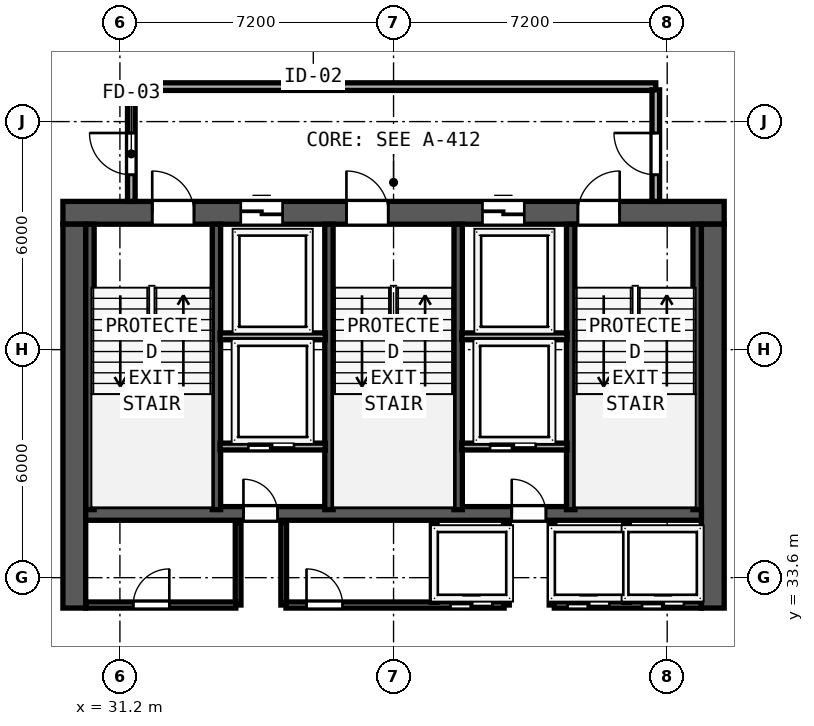
"""IFC4 building model, lengths in metres.
Left out: names, types, materials, properties, quantities, classifications, styles, units other than length and angle.
Written with IfcOpenShell. Run it as: python <this file> out.ifc"""

import sys

from ifc_helpers import new_model, si_unit, direction, frame, frame_2d, origin, place, context, subcontext, project, spatial, rectangle, extrude, element, fill, save


model = new_model("IFC4")
c1 = context("Model", 3, precision=1e-05, world=origin(), true_north=direction((0.0, 1.0)))
c2 = subcontext(c1, "Body", "Model", "MODEL_VIEW")
j1 = project(units=[si_unit("LENGTHUNIT", "METRE"), si_unit("PLANEANGLEUNIT", "RADIAN")], contexts=[c1])
p1 = place(None, origin())
s1 = spatial("IfcSite", under=j1, at=p1, CompositionType="ELEMENT")
p2 = place(p1, origin())
s2 = spatial("IfcBuilding", under=s1, at=p2, CompositionType="ELEMENT")
p3 = place(p2, frame((0.0, 0.0, 169.0)))
s3 = spatial("IfcBuildingStorey", under=s2, at=p3, CompositionType="ELEMENT", Elevation=169.0)
p4 = place(p3, frame((29.7, 43.2, 0.0), z_axis=(0.0, 0.0, 1.0), x_axis=(1.0, 0.0, 0.0)))
e1 = element("IfcWall", 1, at=p4, inside=s3, PredefinedType="SHEAR", context=c2, shape_type="SweptSolid", body=[
    extrude(rectangle(XDim=17.4, YDim=0.6, at=frame_2d((8.7, 0.0))), origin(), (0.0, 0.0, 1.0), 3.62),
])
p5 = place(p4, frame((2.35, 0.0, 0.0)))
e2 = element("IfcOpeningElement", 2, at=p5, cuts=e1, PredefinedType="OPENING", context=c2, shape_type="SweptSolid", body=[
    extrude(rectangle(XDim=1.1, YDim=2.15, at=frame_2d((0.55, 1.075))), frame((0.0, 0.31, 0.0), z_axis=(0.0, -1.0, 0.0), x_axis=(1.0, 0.0, 0.0)), (0.0, 0.0, 1.0), 0.62),
])
p6 = place(p4, frame((7.46, 0.0, 0.0)))
e3 = element("IfcOpeningElement", 3, at=p6, cuts=e1, PredefinedType="OPENING", context=c2, shape_type="SweptSolid", body=[
    extrude(rectangle(XDim=1.1, YDim=2.15, at=frame_2d((0.55, 1.075))), frame((0.0, 0.31, 0.0), z_axis=(0.0, -1.0, 0.0), x_axis=(1.0, 0.0, 0.0)), (0.0, 0.0, 1.0), 0.62),
])
p7 = place(p4, frame((13.55, 0.0, 0.0)))
e4 = element("IfcOpeningElement", 4, at=p7, cuts=e1, PredefinedType="OPENING", context=c2, shape_type="SweptSolid", body=[
    extrude(rectangle(XDim=1.1, YDim=2.15, at=frame_2d((0.55, 1.075))), frame((0.0, 0.31, 0.0), z_axis=(0.0, -1.0, 0.0), x_axis=(1.0, 0.0, 0.0)), (0.0, 0.0, 1.0), 0.62),
])
p8 = place(p4, frame((4.68, 0.0, 0.0)))
e5 = element("IfcOpeningElement", 5, at=p8, cuts=e1, PredefinedType="OPENING", context=c2, shape_type="SweptSolid", body=[
    extrude(rectangle(XDim=1.1, YDim=2.2, at=frame_2d((0.55, 1.1))), frame((0.0, 0.31, 0.0), z_axis=(0.0, -1.0, 0.0), x_axis=(1.0, 0.0, 0.0)), (0.0, 0.0, 1.0), 0.62),
])
p9 = place(p4, frame((11.04, 0.0, 0.0)))
e6 = element("IfcOpeningElement", 6, at=p9, cuts=e1, PredefinedType="OPENING", context=c2, shape_type="SweptSolid", body=[
    extrude(rectangle(XDim=1.1, YDim=2.2, at=frame_2d((0.55, 1.1))), frame((0.0, 0.31, 0.0), z_axis=(0.0, -1.0, 0.0), x_axis=(1.0, 0.0, 0.0)), (0.0, 0.0, 1.0), 0.62),
])
for number, where, z_axis, x_axis in (
    (7, (30.0, 32.8, 0.0), (0.0, 0.0, 1.0), (0.0, 1.0, 0.0)),
    (8, (46.8, 32.8, 0.0), (0.0, 0.0, 1.0), (0.0, 1.0, 0.0)),
):
    element("IfcWall", number, at=place(p3, frame(where, z_axis=z_axis, x_axis=x_axis)), inside=s3, PredefinedType="SHEAR", context=c2, shape_type="SweptSolid", body=[
        extrude(rectangle(XDim=10.1, YDim=0.6, at=frame_2d((5.05, 0.0))), origin(), (0.0, 0.0, 1.0), 3.62),
    ])
p10 = place(p3, frame((30.3, 35.29, 0.0), z_axis=(0.0, 0.0, 1.0), x_axis=(1.0, 0.0, 0.0)))
e9 = element("IfcWall", 9, at=p10, inside=s3, PredefinedType="SHEAR", context=c2, shape_type="SweptSolid", body=[
    extrude(rectangle(XDim=16.2, YDim=0.36, at=frame_2d((8.1, 0.0))), origin(), (0.0, 0.0, 1.0), 3.62),
])
p11 = place(p10, frame((5.05, 0.0, 0.0), z_axis=(0.0, 0.0, 1.0), x_axis=(-1.0, 0.0, 0.0)))
e10 = element("IfcOpeningElement", 10, at=p11, cuts=e9, PredefinedType="OPENING", context=c2, shape_type="SweptSolid", body=[
    extrude(rectangle(XDim=0.9, YDim=2.1, at=frame_2d((0.45, 1.05))), frame((0.0, 0.19, 0.0), z_axis=(0.0, -1.0, 0.0), x_axis=(1.0, 0.0, 0.0)), (0.0, 0.0, 1.0), 0.38),
])
p12 = place(p10, frame((12.11, 0.0, 0.0), z_axis=(0.0, 0.0, 1.0), x_axis=(-1.0, 0.0, 0.0)))
e11 = element("IfcOpeningElement", 11, at=p12, cuts=e9, PredefinedType="OPENING", context=c2, shape_type="SweptSolid", body=[
    extrude(rectangle(XDim=0.9, YDim=2.1, at=frame_2d((0.45, 1.05))), frame((0.0, 0.19, 0.0), z_axis=(0.0, -1.0, 0.0), x_axis=(1.0, 0.0, 0.0)), (0.0, 0.0, 1.0), 0.38),
])
for number, where, z_axis, x_axis in (
    (12, (30.412, 35.39, 0.0), (0.0, 0.0, 1.0), (0.0, 1.0, 0.0)),
    (13, (33.74, 35.39, 0.0), (0.0, 0.0, 1.0), (0.0, 1.0, 0.0)),
    (14, (36.7, 35.39, 0.0), (0.0, 0.0, 1.0), (0.0, 1.0, 0.0)),
    (15, (40.1, 35.39, 0.0), (0.0, 0.0, 1.0), (0.0, 1.0, 0.0)),
    (16, (43.06, 35.39, 0.0), (0.0, 0.0, 1.0), (0.0, 1.0, 0.0)),
    (17, (46.388, 35.39, 0.0), (0.0, 0.0, 1.0), (0.0, 1.0, 0.0)),
):
    element("IfcWall", number, at=place(p3, frame(where, z_axis=z_axis, x_axis=x_axis)), inside=s3, PredefinedType="SHEAR", context=c2, shape_type="SweptSolid", body=[
        extrude(rectangle(XDim=7.51, YDim=0.22, at=frame_2d((3.755, 0.0))), origin(), (0.0, 0.0, 1.0), 3.62),
    ])
p13 = place(p3, frame((31.5, 46.52, 0.0), z_axis=(0.0, 0.0, 1.0), x_axis=(1.0, 0.0, 0.0)))
e18 = element("IfcWall", 18, at=p13, inside=s3, PredefinedType="SOLIDWALL", context=c2, shape_type="SweptSolid", body=[
    extrude(rectangle(XDim=13.8, YDim=0.2, at=frame_2d((6.9, 0.0))), origin(), (0.0, 0.0, 1.0), 3.62),
])
p14 = place(p3, frame((31.5, 43.5, 0.0), z_axis=(0.0, 0.0, 1.0), x_axis=(0.0, 1.0, 0.0)))
e19 = element("IfcWall", 19, at=p14, inside=s3, PredefinedType="SOLIDWALL", context=c2, shape_type="SweptSolid", body=[
    extrude(rectangle(XDim=2.935, YDim=0.2, at=frame_2d((1.468, 0.0))), origin(), (0.0, 0.0, 1.0), 3.62),
])
p15 = place(p14, frame((1.8, 0.0, 0.0), z_axis=(0.0, 0.0, 1.0), x_axis=(-1.0, 0.0, 0.0)))
e20 = element("IfcOpeningElement", 20, at=p15, cuts=e19, PredefinedType="OPENING", context=c2, shape_type="SweptSolid", body=[
    extrude(rectangle(XDim=1.1, YDim=2.15, at=frame_2d((0.55, 1.075))), frame((0.0, 0.11, 0.0), z_axis=(0.0, -1.0, 0.0), x_axis=(1.0, 0.0, 0.0)), (0.0, 0.0, 1.0), 0.22),
])
p16 = place(p3, frame((45.3, 43.5, 0.0), z_axis=(0.0, 0.0, 1.0), x_axis=(0.0, 1.0, 0.0)))
e21 = element("IfcWall", 21, at=p16, inside=s3, PredefinedType="SOLIDWALL", context=c2, shape_type="SweptSolid", body=[
    extrude(rectangle(XDim=2.935, YDim=0.2, at=frame_2d((1.468, 0.0))), origin(), (0.0, 0.0, 1.0), 3.62),
])
p17 = place(p16, frame((0.7, 0.0, 0.0)))
e22 = element("IfcOpeningElement", 22, at=p17, cuts=e21, PredefinedType="OPENING", context=c2, shape_type="SweptSolid", body=[
    extrude(rectangle(XDim=1.1, YDim=2.15, at=frame_2d((0.55, 1.075))), frame((0.0, 0.11, 0.0), z_axis=(0.0, -1.0, 0.0), x_axis=(1.0, 0.0, 0.0)), (0.0, 0.0, 1.0), 0.22),
])
for number, where, z_axis, x_axis in (
    (23, (33.835, 39.95, 0.0), (0.0, 0.0, 1.0), (1.0, 0.0, 0.0)),
    (24, (40.195, 39.95, 0.0), (0.0, 0.0, 1.0), (1.0, 0.0, 0.0)),
):
    element("IfcWall", number, at=place(p3, frame(where, z_axis=z_axis, x_axis=x_axis)), inside=s3, PredefinedType="SOLIDWALL", context=c2, shape_type="SweptSolid", body=[
        extrude(rectangle(XDim=2.77, YDim=0.18, at=frame_2d((1.385, 0.0))), origin(), (0.0, 0.0, 1.0), 3.62),
    ])
p18 = place(p3, frame((33.835, 37.05, 0.0), z_axis=(0.0, 0.0, 1.0), x_axis=(1.0, 0.0, 0.0)))
e25 = element("IfcWall", 25, at=p18, inside=s3, PredefinedType="SOLIDWALL", context=c2, shape_type="SweptSolid", body=[
    extrude(rectangle(XDim=2.77, YDim=0.18, at=frame_2d((1.385, 0.0))), origin(), (0.0, 0.0, 1.0), 3.62),
])
p19 = place(p18, frame((1.945, 0.0, 0.0), z_axis=(0.0, 0.0, 1.0), x_axis=(-1.0, 0.0, 0.0)))
e26 = element("IfcOpeningElement", 26, at=p19, cuts=e25, PredefinedType="OPENING", context=c2, shape_type="SweptSolid", body=[
    extrude(rectangle(XDim=1.2, YDim=2.2, at=frame_2d((0.6, 1.1))), frame((0.0, 0.1, 0.0), z_axis=(0.0, -1.0, 0.0), x_axis=(1.0, 0.0, 0.0)), (0.0, 0.0, 1.0), 0.2),
])
for number, where, z_axis, x_axis in (
    (27, (34.31, 32.88, 0.0), (0.0, 0.0, 1.0), (0.0, 1.0, 0.0)),
    (28, (35.51, 32.88, 0.0), (0.0, 0.0, 1.0), (0.0, 1.0, 0.0)),
):
    element("IfcWall", number, at=place(p3, frame(where, z_axis=z_axis, x_axis=x_axis)), inside=s3, PredefinedType="SOLIDWALL", context=c2, shape_type="SweptSolid", body=[
        extrude(rectangle(XDim=2.17, YDim=0.15, at=frame_2d((1.085, 0.0))), origin(), (0.0, 0.0, 1.0), 3.62),
    ])
p20 = place(p3, frame((40.195, 37.05, 0.0), z_axis=(0.0, 0.0, 1.0), x_axis=(1.0, 0.0, 0.0)))
e29 = element("IfcWall", 29, at=p20, inside=s3, PredefinedType="SOLIDWALL", context=c2, shape_type="SweptSolid", body=[
    extrude(rectangle(XDim=2.77, YDim=0.18, at=frame_2d((1.385, 0.0))), origin(), (0.0, 0.0, 1.0), 3.62),
])
p21 = place(p20, frame((1.945, 0.0, 0.0), z_axis=(0.0, 0.0, 1.0), x_axis=(-1.0, 0.0, 0.0)))
e30 = element("IfcOpeningElement", 30, at=p21, cuts=e29, PredefinedType="OPENING", context=c2, shape_type="SweptSolid", body=[
    extrude(rectangle(XDim=1.2, YDim=2.2, at=frame_2d((0.6, 1.1))), frame((0.0, 0.1, 0.0), z_axis=(0.0, -1.0, 0.0), x_axis=(1.0, 0.0, 0.0)), (0.0, 0.0, 1.0), 0.2),
])
for number, where, z_axis, x_axis in (
    (31, (41.37, 32.88, 0.0), (0.0, 0.0, 1.0), (0.0, 1.0, 0.0)),
    (32, (42.57, 32.88, 0.0), (0.0, 0.0, 1.0), (0.0, 1.0, 0.0)),
):
    element("IfcWall", number, at=place(p3, frame(where, z_axis=z_axis, x_axis=x_axis)), inside=s3, PredefinedType="SOLIDWALL", context=c2, shape_type="SweptSolid", body=[
        extrude(rectangle(XDim=2.17, YDim=0.15, at=frame_2d((1.085, 0.0))), origin(), (0.0, 0.0, 1.0), 3.62),
    ])
p22 = place(p3, frame((30.3, 32.88, 0.0), z_axis=(0.0, 0.0, 1.0), x_axis=(1.0, 0.0, 0.0)))
e33 = element("IfcWall", 33, at=p22, inside=s3, PredefinedType="SOLIDWALL", context=c2, shape_type="SweptSolid", body=[
    extrude(rectangle(XDim=3.95, YDim=0.16, at=frame_2d((1.975, 0.0))), origin(), (0.0, 0.0, 1.0), 3.62),
])
p23 = place(p22, frame((2.2, 0.0, 0.0), z_axis=(0.0, 0.0, 1.0), x_axis=(-1.0, 0.0, 0.0)))
e34 = element("IfcOpeningElement", 34, at=p23, cuts=e33, PredefinedType="OPENING", context=c2, shape_type="SweptSolid", body=[
    extrude(rectangle(XDim=0.95, YDim=2.12, at=frame_2d((0.475, 1.06))), frame((0.0, 0.09, 0.0), z_axis=(0.0, -1.0, 0.0), x_axis=(1.0, 0.0, 0.0)), (0.0, 0.0, 1.0), 0.18),
])
p24 = place(p3, frame((35.57, 32.88, 0.0), z_axis=(0.0, 0.0, 1.0), x_axis=(1.0, 0.0, 0.0)))
e35 = element("IfcWall", 35, at=p24, inside=s3, PredefinedType="SOLIDWALL", context=c2, shape_type="SweptSolid", body=[
    extrude(rectangle(XDim=5.74, YDim=0.16, at=frame_2d((2.87, 0.0))), origin(), (0.0, 0.0, 1.0), 3.62),
])
p25 = place(p24, frame((1.49, 0.0, 0.0), z_axis=(0.0, 0.0, 1.0), x_axis=(-1.0, 0.0, 0.0)))
e36 = element("IfcOpeningElement", 36, at=p25, cuts=e35, PredefinedType="OPENING", context=c2, shape_type="SweptSolid", body=[
    extrude(rectangle(XDim=0.95, YDim=2.12, at=frame_2d((0.475, 1.06))), frame((0.0, 0.09, 0.0), z_axis=(0.0, -1.0, 0.0), x_axis=(1.0, 0.0, 0.0)), (0.0, 0.0, 1.0), 0.18),
])
p26 = place(p24, frame((5.43, 0.0, 0.0), z_axis=(0.0, 0.0, 1.0), x_axis=(-1.0, 0.0, 0.0)))
e37 = element("IfcOpeningElement", 37, at=p26, cuts=e35, PredefinedType="OPENING", context=c2, shape_type="SweptSolid", body=[
    extrude(rectangle(XDim=1.1, YDim=2.2, at=frame_2d((0.55, 1.1))), frame((0.0, 0.09, 0.0), z_axis=(0.0, -1.0, 0.0), x_axis=(1.0, 0.0, 0.0)), (0.0, 0.0, 1.0), 0.18),
])
p27 = place(p3, frame((42.63, 32.88, 0.0), z_axis=(0.0, 0.0, 1.0), x_axis=(1.0, 0.0, 0.0)))
e38 = element("IfcWall", 38, at=p27, inside=s3, PredefinedType="SOLIDWALL", context=c2, shape_type="SweptSolid", body=[
    extrude(rectangle(XDim=3.87, YDim=0.16, at=frame_2d((1.935, 0.0))), origin(), (0.0, 0.0, 1.0), 3.62),
])
p28 = place(p27, frame((1.45, 0.0, 0.0), z_axis=(0.0, 0.0, 1.0), x_axis=(-1.0, 0.0, 0.0)))
e39 = element("IfcOpeningElement", 39, at=p28, cuts=e38, PredefinedType="OPENING", context=c2, shape_type="SweptSolid", body=[
    extrude(rectangle(XDim=1.1, YDim=2.2, at=frame_2d((0.55, 1.1))), frame((0.0, 0.09, 0.0), z_axis=(0.0, -1.0, 0.0), x_axis=(1.0, 0.0, 0.0)), (0.0, 0.0, 1.0), 0.18),
])
p29 = place(p27, frame((3.41, 0.0, 0.0), z_axis=(0.0, 0.0, 1.0), x_axis=(-1.0, 0.0, 0.0)))
e40 = element("IfcOpeningElement", 40, at=p29, cuts=e38, PredefinedType="OPENING", context=c2, shape_type="SweptSolid", body=[
    extrude(rectangle(XDim=1.1, YDim=2.2, at=frame_2d((0.55, 1.1))), frame((0.0, 0.09, 0.0), z_axis=(0.0, -1.0, 0.0), x_axis=(1.0, 0.0, 0.0)), (0.0, 0.0, 1.0), 0.18),
])
for number, where, z_axis, x_axis in (
    (41, (39.47, 32.95, 0.0), (0.0, 0.0, 1.0), (0.0, 1.0, 0.0)),
    (42, (44.53, 32.95, 0.0), (0.0, 0.0, 1.0), (0.0, 1.0, 0.0)),
):
    element("IfcWall", number, at=place(p3, frame(where, z_axis=z_axis, x_axis=x_axis)), inside=s3, PredefinedType="SOLIDWALL", context=c2, shape_type="SweptSolid", body=[
        extrude(rectangle(XDim=2.05, YDim=0.15, at=frame_2d((1.025, 0.0))), origin(), (0.0, 0.0, 1.0), 3.62),
    ])
p30 = place(p5, origin())
e43 = element("IfcDoor", 43, at=p30, inside=s3, OperationType="SINGLE_SWING_LEFT", PredefinedType="DOOR", context=c2, shape_type="SweptSolid", body=[
    extrude(rectangle(XDim=1.1, YDim=2.15, at=frame_2d((0.55, 1.075))), frame((0.0, 0.185, 0.0), z_axis=(0.0, -1.0, 0.0), x_axis=(1.0, 0.0, 0.0)), (0.0, 0.0, 1.0), 0.05),
])
fill(e2, e43)
p31 = place(p6, origin())
e44 = element("IfcDoor", 44, at=p31, inside=s3, OperationType="SINGLE_SWING_LEFT", PredefinedType="DOOR", context=c2, shape_type="SweptSolid", body=[
    extrude(rectangle(XDim=1.1, YDim=2.15, at=frame_2d((0.55, 1.075))), frame((0.0, 0.185, 0.0), z_axis=(0.0, -1.0, 0.0), x_axis=(1.0, 0.0, 0.0)), (0.0, 0.0, 1.0), 0.05),
])
fill(e3, e44)
p32 = place(p7, origin())
e45 = element("IfcDoor", 45, at=p32, inside=s3, OperationType="SINGLE_SWING_RIGHT", PredefinedType="DOOR", context=c2, shape_type="SweptSolid", body=[
    extrude(rectangle(XDim=1.1, YDim=2.15, at=frame_2d((0.55, 1.075))), frame((0.0, 0.185, 0.0), z_axis=(0.0, -1.0, 0.0), x_axis=(1.0, 0.0, 0.0)), (0.0, 0.0, 1.0), 0.05),
])
fill(e4, e45)
p33 = place(p15, origin())
e46 = element("IfcDoor", 46, at=p33, inside=s3, OperationType="SINGLE_SWING_LEFT", PredefinedType="DOOR", context=c2, shape_type="SweptSolid", body=[
    extrude(rectangle(XDim=1.1, YDim=2.15, at=frame_2d((0.55, 1.075))), frame((0.0, 0.025, 0.0), z_axis=(0.0, -1.0, 0.0), x_axis=(1.0, 0.0, 0.0)), (0.0, 0.0, 1.0), 0.05),
])
fill(e20, e46)
p34 = place(p17, origin())
e47 = element("IfcDoor", 47, at=p34, inside=s3, OperationType="SINGLE_SWING_RIGHT", PredefinedType="DOOR", context=c2, shape_type="SweptSolid", body=[
    extrude(rectangle(XDim=1.1, YDim=2.15, at=frame_2d((0.55, 1.075))), frame((0.0, 0.025, 0.0), z_axis=(0.0, -1.0, 0.0), x_axis=(1.0, 0.0, 0.0)), (0.0, 0.0, 1.0), 0.05),
])
fill(e22, e47)
p35 = place(p8, origin())
e48 = element("IfcDoor", 48, at=p35, inside=s3, OperationType="SLIDING_TO_LEFT", PredefinedType="DOOR", context=c2, shape_type="SweptSolid", body=[
    extrude(rectangle(XDim=1.1, YDim=2.2, at=frame_2d((0.55, 1.1))), frame((0.0, 0.185, 0.0), z_axis=(0.0, -1.0, 0.0), x_axis=(1.0, 0.0, 0.0)), (0.0, 0.0, 1.0), 0.05),
])
fill(e5, e48)
p36 = place(p9, origin())
e49 = element("IfcDoor", 49, at=p36, inside=s3, OperationType="SLIDING_TO_LEFT", PredefinedType="DOOR", context=c2, shape_type="SweptSolid", body=[
    extrude(rectangle(XDim=1.1, YDim=2.2, at=frame_2d((0.55, 1.1))), frame((0.0, 0.185, 0.0), z_axis=(0.0, -1.0, 0.0), x_axis=(1.0, 0.0, 0.0)), (0.0, 0.0, 1.0), 0.05),
])
fill(e6, e49)
p37 = place(p19, origin())
e50 = element("IfcDoor", 50, at=p37, inside=s3, OperationType="SLIDING_TO_RIGHT", PredefinedType="DOOR", context=c2, shape_type="SweptSolid", body=[
    extrude(rectangle(XDim=1.2, YDim=2.2, at=frame_2d((0.6, 1.1))), frame((0.0, 0.025, 0.0), z_axis=(0.0, -1.0, 0.0), x_axis=(1.0, 0.0, 0.0)), (0.0, 0.0, 1.0), 0.05),
])
fill(e26, e50)
p38 = place(p11, origin())
e51 = element("IfcDoor", 51, at=p38, inside=s3, OperationType="SINGLE_SWING_RIGHT", PredefinedType="DOOR", context=c2, shape_type="SweptSolid", body=[
    extrude(rectangle(XDim=0.9, YDim=2.1, at=frame_2d((0.45, 1.05))), frame((0.0, 0.025, 0.0), z_axis=(0.0, -1.0, 0.0), x_axis=(1.0, 0.0, 0.0)), (0.0, 0.0, 1.0), 0.05),
])
fill(e10, e51)
p39 = place(p21, origin())
e52 = element("IfcDoor", 52, at=p39, inside=s3, OperationType="SLIDING_TO_RIGHT", PredefinedType="DOOR", context=c2, shape_type="SweptSolid", body=[
    extrude(rectangle(XDim=1.2, YDim=2.2, at=frame_2d((0.6, 1.1))), frame((0.0, 0.025, 0.0), z_axis=(0.0, -1.0, 0.0), x_axis=(1.0, 0.0, 0.0)), (0.0, 0.0, 1.0), 0.05),
])
fill(e30, e52)
p40 = place(p12, origin())
e53 = element("IfcDoor", 53, at=p40, inside=s3, OperationType="SINGLE_SWING_RIGHT", PredefinedType="DOOR", context=c2, shape_type="SweptSolid", body=[
    extrude(rectangle(XDim=0.9, YDim=2.1, at=frame_2d((0.45, 1.05))), frame((0.0, 0.025, 0.0), z_axis=(0.0, -1.0, 0.0), x_axis=(1.0, 0.0, 0.0)), (0.0, 0.0, 1.0), 0.05),
])
fill(e11, e53)
p41 = place(p23, origin())
e54 = element("IfcDoor", 54, at=p41, inside=s3, OperationType="SINGLE_SWING_LEFT", PredefinedType="DOOR", context=c2, shape_type="SweptSolid", body=[
    extrude(rectangle(XDim=0.95, YDim=2.12, at=frame_2d((0.475, 1.06))), frame((0.0, 0.025, 0.0), z_axis=(0.0, -1.0, 0.0), x_axis=(1.0, 0.0, 0.0)), (0.0, 0.0, 1.0), 0.05),
])
fill(e34, e54)
p42 = place(p25, origin())
e55 = element("IfcDoor", 55, at=p42, inside=s3, OperationType="SINGLE_SWING_RIGHT", PredefinedType="DOOR", context=c2, shape_type="SweptSolid", body=[
    extrude(rectangle(XDim=0.95, YDim=2.12, at=frame_2d((0.475, 1.06))), frame((0.0, 0.025, 0.0), z_axis=(0.0, -1.0, 0.0), x_axis=(1.0, 0.0, 0.0)), (0.0, 0.0, 1.0), 0.05),
])
fill(e36, e55)
p43 = place(p26, origin())
e56 = element("IfcDoor", 56, at=p43, inside=s3, OperationType="SLIDING_TO_RIGHT", PredefinedType="DOOR", context=c2, shape_type="SweptSolid", body=[
    extrude(rectangle(XDim=1.1, YDim=2.2, at=frame_2d((0.55, 1.1))), frame((0.0, 0.025, 0.0), z_axis=(0.0, -1.0, 0.0), x_axis=(1.0, 0.0, 0.0)), (0.0, 0.0, 1.0), 0.05),
])
fill(e37, e56)
p44 = place(p28, origin())
e57 = element("IfcDoor", 57, at=p44, inside=s3, OperationType="SLIDING_TO_RIGHT", PredefinedType="DOOR", context=c2, shape_type="SweptSolid", body=[
    extrude(rectangle(XDim=1.1, YDim=2.2, at=frame_2d((0.55, 1.1))), frame((0.0, 0.025, 0.0), z_axis=(0.0, -1.0, 0.0), x_axis=(1.0, 0.0, 0.0)), (0.0, 0.0, 1.0), 0.05),
])
fill(e39, e57)
p45 = place(p29, origin())
e58 = element("IfcDoor", 58, at=p45, inside=s3, OperationType="SLIDING_TO_RIGHT", PredefinedType="DOOR", context=c2, shape_type="SweptSolid", body=[
    extrude(rectangle(XDim=1.1, YDim=2.2, at=frame_2d((0.55, 1.1))), frame((0.0, 0.025, 0.0), z_axis=(0.0, -1.0, 0.0), x_axis=(1.0, 0.0, 0.0)), (0.0, 0.0, 1.0), 0.05),
])
fill(e40, e58)
save(model, sys.argv[1])
